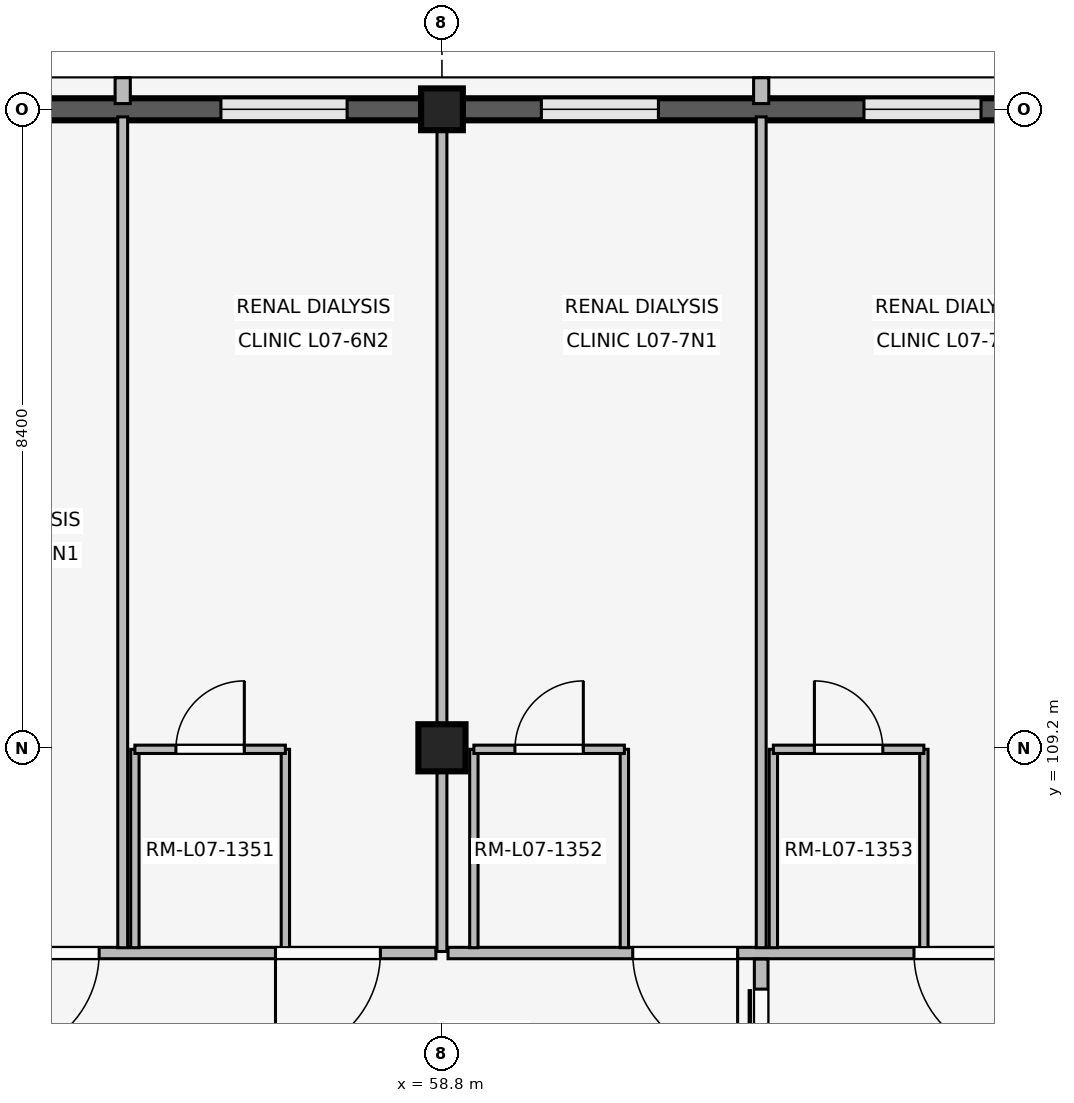
"""IFC4 building model, lengths in metres.
Left out: names, types, materials, properties, quantities, classifications, styles, units other than length and angle.
Written with IfcOpenShell. Run it as: python <this file> out.ifc"""

import sys

from ifc_helpers import new_model, si_unit, direction, frame, frame_2d, origin, origin_2d, place, context, subcontext, project, spatial, rectangle, extrude, element, fill, save


model = new_model("IFC4")
c1 = context("Model", 3, precision=1e-05, world=origin(), true_north=direction((0.0, 1.0)))
c2 = subcontext(c1, "Body", "Model", "MODEL_VIEW")
j1 = project(units=[si_unit("LENGTHUNIT", "METRE"), si_unit("PLANEANGLEUNIT", "RADIAN")], contexts=[c1])
p1 = place(None, origin())
s1 = spatial("IfcSite", under=j1, at=p1, CompositionType="ELEMENT")
p2 = place(p1, origin())
s2 = spatial("IfcBuilding", under=s1, at=p2, CompositionType="ELEMENT")
p3 = place(p2, frame((0.0, 0.0, 28.8)))
s3 = spatial("IfcBuildingStorey", under=s2, at=p3, CompositionType="ELEMENT", Elevation=28.8)
p4 = place(p3, frame((58.8, 109.2, 0.0), z_axis=(0.0, 0.0, 1.0), x_axis=(1.0, 0.0, 0.0)))
e1 = element("IfcColumn", 1, at=p4, inside=s3, PredefinedType="COLUMN", context=c2, shape_type="SweptSolid", body=[
    extrude(rectangle(XDim=0.62, YDim=0.62, at=origin_2d()), origin(), (0.0, 0.0, 1.0), 4.2),
])
p5 = place(p3, frame((58.8, 117.6, 0.0), z_axis=(0.0, 0.0, 1.0), x_axis=(1.0, 0.0, 0.0)))
e2 = element("IfcColumn", 2, at=p5, inside=s3, PredefinedType="COLUMN", context=c2, shape_type="SweptSolid", body=[
    extrude(rectangle(XDim=0.55, YDim=0.55, at=origin_2d()), origin(), (0.0, 0.0, 1.0), 4.2),
])
p6 = place(p3, frame((50.67, 117.6, 0.0), z_axis=(0.0, 0.0, 1.0), x_axis=(1.0, 0.0, 0.0)))
e3 = element("IfcWall", 3, at=p6, inside=s3, PredefinedType="SOLIDWALL", context=c2, shape_type="SweptSolid", body=[
    extrude(rectangle(XDim=7.86, YDim=0.29, at=frame_2d((3.93, 0.0))), origin(), (0.0, 0.0, 1.0), 3.34),
])
p7 = place(p6, frame((0.978, 0.0, 0.85)))
e4 = element("IfcOpeningElement", 4, at=p7, cuts=e3, PredefinedType="OPENING", context=c2, shape_type="SweptSolid", body=[
    extrude(rectangle(XDim=1.66, YDim=1.95, at=frame_2d((0.83, 0.975))), frame((0.0, 0.155, 0.0), z_axis=(0.0, -1.0, 0.0), x_axis=(1.0, 0.0, 0.0)), (0.0, 0.0, 1.0), 0.31),
])
p8 = place(p6, frame((5.222, 0.0, 0.85)))
e5 = element("IfcOpeningElement", 5, at=p8, cuts=e3, PredefinedType="OPENING", context=c2, shape_type="SweptSolid", body=[
    extrude(rectangle(XDim=1.66, YDim=1.95, at=frame_2d((0.83, 0.975))), frame((0.0, 0.155, 0.0), z_axis=(0.0, -1.0, 0.0), x_axis=(1.0, 0.0, 0.0)), (0.0, 0.0, 1.0), 0.31),
])
p9 = place(p3, frame((54.6, 117.675, 0.0), z_axis=(0.0, 0.0, 1.0), x_axis=(0.0, 1.0, 0.0)))
e6 = element("IfcWall", 6, at=p9, inside=s3, PredefinedType="ELEMENTEDWALL", context=c2, shape_type="SweptSolid", body=[
    extrude(rectangle(XDim=0.34, YDim=0.2, at=frame_2d((0.17, 0.0))), origin(), (0.0, 0.0, 1.0), 3.32),
])
p10 = place(p3, frame((59.07, 117.6, 0.0), z_axis=(0.0, 0.0, 1.0), x_axis=(1.0, 0.0, 0.0)))
e7 = element("IfcWall", 7, at=p10, inside=s3, PredefinedType="SOLIDWALL", context=c2, shape_type="SweptSolid", body=[
    extrude(rectangle(XDim=7.86, YDim=0.29, at=frame_2d((3.93, 0.0))), origin(), (0.0, 0.0, 1.0), 3.34),
])
p11 = place(p10, frame((1.038, 0.0, 0.85)))
e8 = element("IfcOpeningElement", 8, at=p11, cuts=e7, PredefinedType="OPENING", context=c2, shape_type="SweptSolid", body=[
    extrude(rectangle(XDim=1.54, YDim=1.85, at=frame_2d((0.77, 0.925))), frame((0.0, 0.155, 0.0), z_axis=(0.0, -1.0, 0.0), x_axis=(1.0, 0.0, 0.0)), (0.0, 0.0, 1.0), 0.31),
])
p12 = place(p10, frame((5.282, 0.0, 0.85)))
e9 = element("IfcOpeningElement", 9, at=p12, cuts=e7, PredefinedType="OPENING", context=c2, shape_type="SweptSolid", body=[
    extrude(rectangle(XDim=1.54, YDim=1.85, at=frame_2d((0.77, 0.925))), frame((0.0, 0.155, 0.0), z_axis=(0.0, -1.0, 0.0), x_axis=(1.0, 0.0, 0.0)), (0.0, 0.0, 1.0), 0.31),
])
p13 = place(p3, frame((63.0, 117.675, 0.0), z_axis=(0.0, 0.0, 1.0), x_axis=(0.0, 1.0, 0.0)))
e10 = element("IfcWall", 10, at=p13, inside=s3, PredefinedType="ELEMENTEDWALL", context=c2, shape_type="SweptSolid", body=[
    extrude(rectangle(XDim=0.34, YDim=0.2, at=frame_2d((0.17, 0.0))), origin(), (0.0, 0.0, 1.0), 3.32),
])
p14 = place(p3, frame((58.72, 106.5, 0.0), z_axis=(0.0, 0.0, 1.0), x_axis=(-1.0, 0.0, 0.0)))
e11 = element("IfcWall", 11, at=p14, inside=s3, PredefinedType="PARTITIONING", context=c2, shape_type="SweptSolid", body=[
    extrude(rectangle(XDim=7.96, YDim=0.15, at=frame_2d((3.98, 0.0))), origin(), (0.0, 0.0, 1.0), 3.32),
])
p15 = place(p14, frame((0.73, 0.0, 0.0)))
e12 = element("IfcOpeningElement", 12, at=p15, cuts=e11, PredefinedType="OPENING", context=c2, shape_type="SweptSolid", body=[
    extrude(rectangle(XDim=1.38, YDim=2.25, at=frame_2d((0.69, 1.125))), frame((0.0, 0.085, 0.0), z_axis=(0.0, -1.0, 0.0), x_axis=(1.0, 0.0, 0.0)), (0.0, 0.0, 1.0), 0.17),
])
p16 = place(p14, frame((4.43, 0.0, 0.0)))
e13 = element("IfcOpeningElement", 13, at=p16, cuts=e11, PredefinedType="OPENING", context=c2, shape_type="SweptSolid", body=[
    extrude(rectangle(XDim=1.38, YDim=2.25, at=frame_2d((0.69, 1.125))), frame((0.0, 0.085, 0.0), z_axis=(0.0, -1.0, 0.0), x_axis=(1.0, 0.0, 0.0)), (0.0, 0.0, 1.0), 0.17),
])
p17 = place(p3, frame((54.6, 106.57, 0.0), z_axis=(0.0, 0.0, 1.0), x_axis=(0.0, 1.0, 0.0)))
e14 = element("IfcWall", 14, at=p17, inside=s3, PredefinedType="PARTITIONING", context=c2, shape_type="SweptSolid", body=[
    extrude(rectangle(XDim=10.93, YDim=0.13, at=frame_2d((5.465, 0.0))), origin(), (0.0, 0.0, 1.0), 3.32),
])
for number, where, z_axis, x_axis in (
    (15, (54.76, 106.57, 0.0), (0.0, 0.0, 1.0), (0.0, 1.0, 0.0)),
    (16, (56.74, 106.57, 0.0), (0.0, 0.0, 1.0), (0.0, 1.0, 0.0)),
):
    element("IfcWall", number, at=place(p3, frame(where, z_axis=z_axis, x_axis=x_axis)), inside=s3, PredefinedType="PARTITIONING", context=c2, shape_type="SweptSolid", body=[
        extrude(rectangle(XDim=2.61, YDim=0.11, at=frame_2d((1.305, 0.0))), origin(), (0.0, 0.0, 1.0), 3.32),
    ])
p18 = place(p3, frame((54.76, 109.18, 0.0), z_axis=(0.0, 0.0, 1.0), x_axis=(1.0, 0.0, 0.0)))
e17 = element("IfcWall", 17, at=p18, inside=s3, PredefinedType="PARTITIONING", context=c2, shape_type="SweptSolid", body=[
    extrude(rectangle(XDim=1.98, YDim=0.11, at=frame_2d((0.99, 0.0))), origin(), (0.0, 0.0, 1.0), 3.32),
])
p19 = place(p18, frame((0.54, 0.0, 0.0)))
e18 = element("IfcOpeningElement", 18, at=p19, cuts=e17, PredefinedType="OPENING", context=c2, shape_type="SweptSolid", body=[
    extrude(rectangle(XDim=0.9, YDim=2.1, at=frame_2d((0.45, 1.05))), frame((0.0, 0.065, 0.0), z_axis=(0.0, -1.0, 0.0), x_axis=(1.0, 0.0, 0.0)), (0.0, 0.0, 1.0), 0.13),
])
p20 = place(p3, frame((58.8, 106.52, 0.0), z_axis=(0.0, 0.0, 1.0), x_axis=(0.0, 1.0, 0.0)))
e19 = element("IfcWall", 19, at=p20, inside=s3, PredefinedType="PARTITIONING", context=c2, shape_type="SweptSolid", body=[
    extrude(rectangle(XDim=10.94, YDim=0.13, at=frame_2d((5.47, 0.0))), origin(), (0.0, 0.0, 1.0), 3.32),
])
p21 = place(p3, frame((67.12, 106.5, 0.0), z_axis=(0.0, 0.0, 1.0), x_axis=(-1.0, 0.0, 0.0)))
e20 = element("IfcWall", 20, at=p21, inside=s3, PredefinedType="PARTITIONING", context=c2, shape_type="SweptSolid", body=[
    extrude(rectangle(XDim=8.24, YDim=0.15, at=frame_2d((4.12, 0.0))), origin(), (0.0, 0.0, 1.0), 3.32),
])
p22 = place(p21, frame((0.73, 0.0, 0.0)))
e21 = element("IfcOpeningElement", 21, at=p22, cuts=e20, PredefinedType="OPENING", context=c2, shape_type="SweptSolid", body=[
    extrude(rectangle(XDim=1.38, YDim=2.25, at=frame_2d((0.69, 1.125))), frame((0.0, 0.085, 0.0), z_axis=(0.0, -1.0, 0.0), x_axis=(1.0, 0.0, 0.0)), (0.0, 0.0, 1.0), 0.17),
])
p23 = place(p21, frame((4.43, 0.0, 0.0)))
e22 = element("IfcOpeningElement", 22, at=p23, cuts=e20, PredefinedType="OPENING", context=c2, shape_type="SweptSolid", body=[
    extrude(rectangle(XDim=1.38, YDim=2.25, at=frame_2d((0.69, 1.125))), frame((0.0, 0.085, 0.0), z_axis=(0.0, -1.0, 0.0), x_axis=(1.0, 0.0, 0.0)), (0.0, 0.0, 1.0), 0.17),
])
p24 = place(p3, frame((63.0, 106.57, 0.0), z_axis=(0.0, 0.0, 1.0), x_axis=(0.0, 1.0, 0.0)))
e23 = element("IfcWall", 23, at=p24, inside=s3, PredefinedType="PARTITIONING", context=c2, shape_type="SweptSolid", body=[
    extrude(rectangle(XDim=10.93, YDim=0.13, at=frame_2d((5.465, 0.0))), origin(), (0.0, 0.0, 1.0), 3.32),
])
for number, where, z_axis, x_axis in (
    (24, (59.22, 106.57, 0.0), (0.0, 0.0, 1.0), (0.0, 1.0, 0.0)),
    (25, (61.2, 106.57, 0.0), (0.0, 0.0, 1.0), (0.0, 1.0, 0.0)),
):
    element("IfcWall", number, at=place(p3, frame(where, z_axis=z_axis, x_axis=x_axis)), inside=s3, PredefinedType="PARTITIONING", context=c2, shape_type="SweptSolid", body=[
        extrude(rectangle(XDim=2.61, YDim=0.11, at=frame_2d((1.305, 0.0))), origin(), (0.0, 0.0, 1.0), 3.32),
    ])
p25 = place(p3, frame((59.22, 109.18, 0.0), z_axis=(0.0, 0.0, 1.0), x_axis=(1.0, 0.0, 0.0)))
e26 = element("IfcWall", 26, at=p25, inside=s3, PredefinedType="PARTITIONING", context=c2, shape_type="SweptSolid", body=[
    extrude(rectangle(XDim=1.98, YDim=0.11, at=frame_2d((0.99, 0.0))), origin(), (0.0, 0.0, 1.0), 3.32),
])
p26 = place(p25, frame((0.54, 0.0, 0.0)))
e27 = element("IfcOpeningElement", 27, at=p26, cuts=e26, PredefinedType="OPENING", context=c2, shape_type="SweptSolid", body=[
    extrude(rectangle(XDim=0.9, YDim=2.1, at=frame_2d((0.45, 1.05))), frame((0.0, 0.065, 0.0), z_axis=(0.0, -1.0, 0.0), x_axis=(1.0, 0.0, 0.0)), (0.0, 0.0, 1.0), 0.13),
])
for number, where, z_axis, x_axis in (
    (28, (63.16, 106.57, 0.0), (0.0, 0.0, 1.0), (0.0, 1.0, 0.0)),
    (29, (65.14, 106.57, 0.0), (0.0, 0.0, 1.0), (0.0, 1.0, 0.0)),
):
    element("IfcWall", number, at=place(p3, frame(where, z_axis=z_axis, x_axis=x_axis)), inside=s3, PredefinedType="PARTITIONING", context=c2, shape_type="SweptSolid", body=[
        extrude(rectangle(XDim=2.61, YDim=0.11, at=frame_2d((1.305, 0.0))), origin(), (0.0, 0.0, 1.0), 3.32),
    ])
p27 = place(p3, frame((63.16, 109.18, 0.0), z_axis=(0.0, 0.0, 1.0), x_axis=(1.0, 0.0, 0.0)))
e30 = element("IfcWall", 30, at=p27, inside=s3, PredefinedType="PARTITIONING", context=c2, shape_type="SweptSolid", body=[
    extrude(rectangle(XDim=1.98, YDim=0.11, at=frame_2d((0.99, 0.0))), origin(), (0.0, 0.0, 1.0), 3.32),
])
p28 = place(p27, frame((0.54, 0.0, 0.0)))
e31 = element("IfcOpeningElement", 31, at=p28, cuts=e30, PredefinedType="OPENING", context=c2, shape_type="SweptSolid", body=[
    extrude(rectangle(XDim=0.9, YDim=2.1, at=frame_2d((0.45, 1.05))), frame((0.0, 0.065, 0.0), z_axis=(0.0, -1.0, 0.0), x_axis=(1.0, 0.0, 0.0)), (0.0, 0.0, 1.0), 0.13),
])
p29 = place(p3, frame((63.0, 103.58, 0.0), z_axis=(0.0, 0.0, 1.0), x_axis=(0.0, 1.0, 0.0)))
e32 = element("IfcWall", 32, at=p29, inside=s3, PredefinedType="PARTITIONING", context=c2, shape_type="SweptSolid", body=[
    extrude(rectangle(XDim=2.84, YDim=0.18, at=frame_2d((1.42, 0.0))), origin(), (0.0, 0.0, 1.0), 3.32),
])
p30 = place(p29, frame((0.395, 0.0, 0.0)))
e33 = element("IfcOpeningElement", 33, at=p30, cuts=e32, PredefinedType="OPENING", context=c2, shape_type="SweptSolid", body=[
    extrude(rectangle(XDim=2.05, YDim=2.35, at=frame_2d((1.025, 1.175))), frame((0.0, 0.1, 0.0), z_axis=(0.0, -1.0, 0.0), x_axis=(1.0, 0.0, 0.0)), (0.0, 0.0, 1.0), 0.2),
])
p31 = place(p8, origin())
e34 = element("IfcWindow", 34, at=p31, inside=s3, PartitioningType="SINGLE_PANEL", PredefinedType="WINDOW", context=c2, shape_type="SweptSolid", body=[
    extrude(rectangle(XDim=1.66, YDim=1.95, at=frame_2d((0.83, 0.975))), frame((0.0, 0.03, 0.0), z_axis=(0.0, -1.0, 0.0), x_axis=(1.0, 0.0, 0.0)), (0.0, 0.0, 1.0), 0.06),
])
fill(e5, e34)
p32 = place(p11, origin())
e35 = element("IfcWindow", 35, at=p32, inside=s3, PartitioningType="SINGLE_PANEL", PredefinedType="WINDOW", context=c2, shape_type="SweptSolid", body=[
    extrude(rectangle(XDim=1.54, YDim=1.85, at=frame_2d((0.77, 0.925))), frame((0.0, 0.03, 0.0), z_axis=(0.0, -1.0, 0.0), x_axis=(1.0, 0.0, 0.0)), (0.0, 0.0, 1.0), 0.06),
])
fill(e8, e35)
p33 = place(p12, origin())
e36 = element("IfcWindow", 36, at=p33, inside=s3, PartitioningType="SINGLE_PANEL", PredefinedType="WINDOW", context=c2, shape_type="SweptSolid", body=[
    extrude(rectangle(XDim=1.54, YDim=1.85, at=frame_2d((0.77, 0.925))), frame((0.0, 0.03, 0.0), z_axis=(0.0, -1.0, 0.0), x_axis=(1.0, 0.0, 0.0)), (0.0, 0.0, 1.0), 0.06),
])
fill(e9, e36)
p34 = place(p15, origin())
e37 = element("IfcDoor", 37, at=p34, inside=s3, OperationType="SINGLE_SWING_RIGHT", PredefinedType="DOOR", context=c2, shape_type="SweptSolid", body=[
    extrude(rectangle(XDim=1.38, YDim=2.25, at=frame_2d((0.69, 1.125))), frame((0.0, 0.025, 0.0), z_axis=(0.0, -1.0, 0.0), x_axis=(1.0, 0.0, 0.0)), (0.0, 0.0, 1.0), 0.05),
])
fill(e12, e37)
p35 = place(p16, origin())
e38 = element("IfcDoor", 38, at=p35, inside=s3, OperationType="SINGLE_SWING_RIGHT", PredefinedType="DOOR", context=c2, shape_type="SweptSolid", body=[
    extrude(rectangle(XDim=1.38, YDim=2.25, at=frame_2d((0.69, 1.125))), frame((0.0, 0.025, 0.0), z_axis=(0.0, -1.0, 0.0), x_axis=(1.0, 0.0, 0.0)), (0.0, 0.0, 1.0), 0.05),
])
fill(e13, e38)
p36 = place(p19, origin())
e39 = element("IfcDoor", 39, at=p36, inside=s3, OperationType="SINGLE_SWING_RIGHT", PredefinedType="DOOR", context=c2, shape_type="SweptSolid", body=[
    extrude(rectangle(XDim=0.9, YDim=2.1, at=frame_2d((0.45, 1.05))), frame((0.0, 0.025, 0.0), z_axis=(0.0, -1.0, 0.0), x_axis=(1.0, 0.0, 0.0)), (0.0, 0.0, 1.0), 0.05),
])
fill(e18, e39)
p37 = place(p22, origin())
e40 = element("IfcDoor", 40, at=p37, inside=s3, OperationType="SINGLE_SWING_LEFT", PredefinedType="DOOR", context=c2, shape_type="SweptSolid", body=[
    extrude(rectangle(XDim=1.38, YDim=2.25, at=frame_2d((0.69, 1.125))), frame((0.0, 0.025, 0.0), z_axis=(0.0, -1.0, 0.0), x_axis=(1.0, 0.0, 0.0)), (0.0, 0.0, 1.0), 0.05),
])
fill(e21, e40)
p38 = place(p23, origin())
e41 = element("IfcDoor", 41, at=p38, inside=s3, OperationType="SINGLE_SWING_LEFT", PredefinedType="DOOR", context=c2, shape_type="SweptSolid", body=[
    extrude(rectangle(XDim=1.38, YDim=2.25, at=frame_2d((0.69, 1.125))), frame((0.0, 0.025, 0.0), z_axis=(0.0, -1.0, 0.0), x_axis=(1.0, 0.0, 0.0)), (0.0, 0.0, 1.0), 0.05),
])
fill(e22, e41)
p39 = place(p26, origin())
e42 = element("IfcDoor", 42, at=p39, inside=s3, OperationType="SINGLE_SWING_RIGHT", PredefinedType="DOOR", context=c2, shape_type="SweptSolid", body=[
    extrude(rectangle(XDim=0.9, YDim=2.1, at=frame_2d((0.45, 1.05))), frame((0.0, 0.025, 0.0), z_axis=(0.0, -1.0, 0.0), x_axis=(1.0, 0.0, 0.0)), (0.0, 0.0, 1.0), 0.05),
])
fill(e27, e42)
p40 = place(p28, origin())
e43 = element("IfcDoor", 43, at=p40, inside=s3, OperationType="SINGLE_SWING_LEFT", PredefinedType="DOOR", context=c2, shape_type="SweptSolid", body=[
    extrude(rectangle(XDim=0.9, YDim=2.1, at=frame_2d((0.45, 1.05))), frame((0.0, 0.025, 0.0), z_axis=(0.0, -1.0, 0.0), x_axis=(1.0, 0.0, 0.0)), (0.0, 0.0, 1.0), 0.05),
])
fill(e31, e43)
p41 = place(p30, origin())
e44 = element("IfcDoor", 44, at=p41, inside=s3, OperationType="SLIDING_TO_LEFT", PredefinedType="DOOR", context=c2, shape_type="SweptSolid", body=[
    extrude(rectangle(XDim=2.05, YDim=2.35, at=frame_2d((1.025, 1.175))), frame((0.0, 0.025, 0.0), z_axis=(0.0, -1.0, 0.0), x_axis=(1.0, 0.0, 0.0)), (0.0, 0.0, 1.0), 0.05),
])
fill(e33, e44)
save(model, sys.argv[1])
